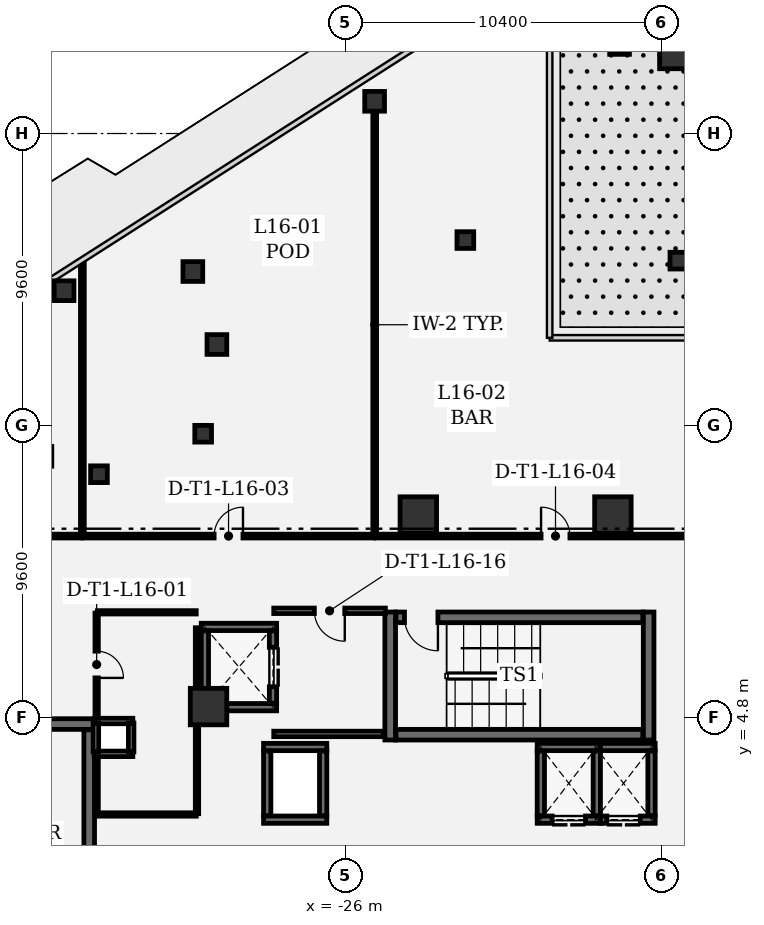
"""IFC4 building model, lengths in metres.
Left out: names, types, materials, properties, quantities, classifications, styles, units other than length and angle.
Written with IfcOpenShell. Run it as: python <this file> out.ifc"""

import sys

from ifc_helpers import new_model, si_unit, direction, frame, frame_2d, origin, origin_2d, place, context, subcontext, project, spatial, rectangle, extrude, element, fill, save


model = new_model("IFC4")
c1 = context("Model", 3, precision=1e-05, world=origin(), true_north=direction((0.0, 1.0)))
c2 = subcontext(c1, "Body", "Model", "MODEL_VIEW")
j1 = project(units=[si_unit("LENGTHUNIT", "METRE"), si_unit("PLANEANGLEUNIT", "RADIAN")], contexts=[c1])
p1 = place(None, origin())
s1 = spatial("IfcSite", under=j1, at=p1, CompositionType="ELEMENT")
p2 = place(p1, origin())
s2 = spatial("IfcBuilding", under=s1, at=p2, CompositionType="ELEMENT")
p3 = place(p2, frame((0.0, 0.0, 74.4)))
s3 = spatial("IfcBuildingStorey", under=s2, at=p3, CompositionType="ELEMENT", Elevation=74.4)
p4 = place(p3, frame((-14.464, 27.331, 0.0), z_axis=(0.0, 0.0, 1.0), x_axis=(1.0, 0.0, 0.0)))
e1 = element("IfcColumn", 1, at=p4, inside=s3, PredefinedType="COLUMN", context=c2, shape_type="SweptSolid", body=[
    extrude(rectangle(XDim=2.4, YDim=2.4, at=origin_2d()), origin(), (0.0, 0.0, 1.0), 4.2),
])
for number, where, z_axis, x_axis in (
    (2, (-23.6, 11.45, 0.0), (0.0, 0.0, 1.0), (1.0, 0.0, 0.0)),
    (3, (-17.2, 11.45, 0.0), (0.0, 0.0, 1.0), (1.0, 0.0, 0.0)),
    (4, (-30.5, 5.15, 0.0), (0.0, 0.0, 1.0), (1.0, 0.0, 0.0)),
):
    element("IfcColumn", number, at=place(p3, frame(where, z_axis=z_axis, x_axis=x_axis)), inside=s3, PredefinedType="COLUMN", context=c2, shape_type="SweptSolid", body=[
        extrude(rectangle(XDim=1.2, YDim=1.2, at=origin_2d()), origin(), (0.0, 0.0, 1.0), 4.2),
    ])
for number, where, z_axis, x_axis in (
    (5, (-35.252, 18.829, 0.0), (0.0, 0.0, 1.0), (1.0, 0.0, 0.0)),
    (6, (-25.038, 25.059, 0.0), (0.0, 0.0, 1.0), (1.0, 0.0, 0.0)),
    (7, (-31.016, 19.46, 0.0), (0.0, 0.0, 1.0), (1.0, 0.0, 0.0)),
    (8, (-16.981, 26.929, 0.0), (0.0, 0.0, 1.0), (1.0, 0.0, 0.0)),
    (9, (-30.225, 17.06, 0.0), (0.0, 0.0, 1.0), (1.0, 0.0, 0.0)),
):
    element("IfcColumn", number, at=place(p3, frame(where, z_axis=z_axis, x_axis=x_axis)), inside=s3, PredefinedType="COLUMN", context=c2, shape_type="SweptSolid", body=[
        extrude(rectangle(XDim=0.65, YDim=0.65, at=origin_2d()), origin(), (0.0, 0.0, 1.0), 4.2),
    ])
for number, where, z_axis, x_axis in (
    (10, (-34.104, 12.792, 0.0), (0.0, 0.0, 1.0), (1.0, 0.0, 0.0)),
    (11, (-22.053, 20.495, 0.0), (0.0, 0.0, 1.0), (1.0, 0.0, 0.0)),
    (12, (-30.677, 14.124, 0.0), (0.0, 0.0, 1.0), (1.0, 0.0, 0.0)),
    (13, (-15.046, 19.818, 0.0), (0.0, 0.0, 1.0), (1.0, 0.0, 0.0)),
):
    element("IfcColumn", number, at=place(p3, frame(where, z_axis=z_axis, x_axis=x_axis)), inside=s3, PredefinedType="COLUMN", context=c2, shape_type="SweptSolid", body=[
        extrude(rectangle(XDim=0.55, YDim=0.55, at=origin_2d()), origin(), (0.0, 0.0, 1.0), 4.2),
    ])
for number, where, z_axis, x_axis in (
    (14, (-24.525, 8.26, 0.0), (0.0, 0.0, 1.0), (0.0, -1.0, 0.0)),
    (15, (-16.025, 4.05, 0.0), (0.0, 0.0, 1.0), (0.0, 1.0, 0.0)),
):
    element("IfcWall", number, at=place(p3, frame(where, z_axis=z_axis, x_axis=x_axis)), inside=s3, PredefinedType="SHEAR", context=c2, shape_type="SweptSolid", body=[
        extrude(rectangle(XDim=4.21, YDim=0.35, at=frame_2d((2.105, 0.0))), origin(), (0.0, 0.0, 1.0), 3.92),
    ])
p5 = place(p3, frame((-24.335, 4.225, 0.0), z_axis=(0.0, 0.0, 1.0), x_axis=(1.0, 0.0, 0.0)))
e16 = element("IfcWall", 16, at=p5, inside=s3, PredefinedType="SHEAR", context=c2, shape_type="SweptSolid", body=[
    extrude(rectangle(XDim=8.12, YDim=0.35, at=frame_2d((4.06, 0.0))), origin(), (0.0, 0.0, 1.0), 3.92),
])
p6 = place(p3, frame((-16.215, 8.085, 0.0), z_axis=(0.0, 0.0, 1.0), x_axis=(-1.0, 0.0, 0.0)))
e17 = element("IfcWall", 17, at=p6, inside=s3, PredefinedType="SHEAR", context=c2, shape_type="SweptSolid", body=[
    extrude(rectangle(XDim=8.12, YDim=0.35, at=frame_2d((4.06, 0.0))), origin(), (0.0, 0.0, 1.0), 3.92),
])
p7 = place(p6, frame((6.74, 0.0, 0.0)))
e18 = element("IfcOpeningElement", 18, at=p7, cuts=e17, PredefinedType="OPENING", context=c2, shape_type="SweptSolid", body=[
    extrude(rectangle(XDim=1.1, YDim=2.2, at=frame_2d((0.55, 1.1))), frame((0.0, 0.185, 0.0), z_axis=(0.0, -1.0, 0.0), x_axis=(1.0, 0.0, 0.0)), (0.0, 0.0, 1.0), 0.37),
])
p8 = place(p3, frame((-34.25, 4.575, 0.0), z_axis=(0.0, 0.0, 1.0), x_axis=(-1.0, 0.0, 0.0)))
e19 = element("IfcWall", 19, at=p8, inside=s3, PredefinedType="SHEAR", context=c2, shape_type="SweptSolid", body=[
    extrude(rectangle(XDim=4.21, YDim=0.35, at=frame_2d((2.105, 0.0))), origin(), (0.0, 0.0, 1.0), 3.92),
])
p9 = place(p3, frame((-34.425, -4.385, 0.0), z_axis=(0.0, 0.0, 1.0), x_axis=(0.0, 1.0, 0.0)))
e20 = element("IfcWall", 20, at=p9, inside=s3, PredefinedType="SHEAR", context=c2, shape_type="SweptSolid", body=[
    extrude(rectangle(XDim=8.77, YDim=0.35, at=frame_2d((4.385, 0.0))), origin(), (0.0, 0.0, 1.0), 3.92),
])
for number, where, z_axis, x_axis in (
    (21, (-28.26, 5.13, 0.0), (0.0, 0.0, 1.0), (-1.0, 0.0, 0.0)),
    (22, (-30.74, 7.77, 0.0), (0.0, 0.0, 1.0), (1.0, 0.0, 0.0)),
):
    element("IfcWall", number, at=place(p3, frame(where, z_axis=z_axis, x_axis=x_axis)), inside=s3, PredefinedType="SHEAR", context=c2, shape_type="SweptSolid", body=[
        extrude(rectangle(XDim=2.48, YDim=0.24, at=frame_2d((1.24, 0.0))), origin(), (0.0, 0.0, 1.0), 3.92),
    ])
p10 = place(p3, frame((-30.62, 5.262, 0.0), z_axis=(0.0, 0.0, 1.0), x_axis=(0.0, 1.0, 0.0)))
e23 = element("IfcWall", 23, at=p10, inside=s3, PredefinedType="SHEAR", context=c2, shape_type="SweptSolid", body=[
    extrude(rectangle(XDim=2.376, YDim=0.24, at=frame_2d((1.188, 0.0))), origin(), (0.0, 0.0, 1.0), 3.92),
])
p11 = place(p3, frame((-28.38, 7.638, 0.0), z_axis=(0.0, 0.0, 1.0), x_axis=(0.0, -1.0, 0.0)))
e24 = element("IfcWall", 24, at=p11, inside=s3, PredefinedType="SHEAR", context=c2, shape_type="SweptSolid", body=[
    extrude(rectangle(XDim=2.376, YDim=0.24, at=frame_2d((1.188, 0.0))), origin(), (0.0, 0.0, 1.0), 3.92),
])
p12 = place(p11, frame((0.538, 0.0, 0.0)))
e25 = element("IfcOpeningElement", 25, at=p12, cuts=e24, PredefinedType="OPENING", context=c2, shape_type="SweptSolid", body=[
    extrude(rectangle(XDim=1.3, YDim=2.3, at=frame_2d((0.65, 1.15))), frame((0.0, 0.13, 0.0), z_axis=(0.0, -1.0, 0.0), x_axis=(1.0, 0.0, 0.0)), (0.0, 0.0, 1.0), 0.26),
])
for number, where, z_axis, x_axis in (
    (26, (-26.61, 1.43, 0.0), (0.0, 0.0, 1.0), (-1.0, 0.0, 0.0)),
    (27, (-28.69, 3.82, 0.0), (0.0, 0.0, 1.0), (1.0, 0.0, 0.0)),
):
    element("IfcWall", number, at=place(p3, frame(where, z_axis=z_axis, x_axis=x_axis)), inside=s3, PredefinedType="SHEAR", context=c2, shape_type="SweptSolid", body=[
        extrude(rectangle(XDim=2.08, YDim=0.24, at=frame_2d((1.04, 0.0))), origin(), (0.0, 0.0, 1.0), 3.92),
    ])
for number, where, z_axis, x_axis in (
    (28, (-28.57, 1.562, 0.0), (0.0, 0.0, 1.0), (0.0, 1.0, 0.0)),
    (29, (-26.73, 3.688, 0.0), (0.0, 0.0, 1.0), (0.0, -1.0, 0.0)),
):
    element("IfcWall", number, at=place(p3, frame(where, z_axis=z_axis, x_axis=x_axis)), inside=s3, PredefinedType="SHEAR", context=c2, shape_type="SweptSolid", body=[
        extrude(rectangle(XDim=2.126, YDim=0.24, at=frame_2d((1.063, 0.0))), origin(), (0.0, 0.0, 1.0), 3.92),
    ])
p13 = place(p3, frame((-17.61, 1.43, 0.0), z_axis=(0.0, 0.0, 1.0), x_axis=(-1.0, 0.0, 0.0)))
e30 = element("IfcWall", 30, at=p13, inside=s3, PredefinedType="SHEAR", context=c2, shape_type="SweptSolid", body=[
    extrude(rectangle(XDim=2.08, YDim=0.24, at=frame_2d((1.04, 0.0))), origin(), (0.0, 0.0, 1.0), 3.92),
])
p14 = place(p13, frame((0.49, 0.0, 0.0)))
e31 = element("IfcOpeningElement", 31, at=p14, cuts=e30, PredefinedType="OPENING", context=c2, shape_type="SweptSolid", body=[
    extrude(rectangle(XDim=1.1, YDim=2.2, at=frame_2d((0.55, 1.1))), frame((0.0, 0.13, 0.0), z_axis=(0.0, -1.0, 0.0), x_axis=(1.0, 0.0, 0.0)), (0.0, 0.0, 1.0), 0.26),
])
p15 = place(p3, frame((-19.69, 3.82, 0.0), z_axis=(0.0, 0.0, 1.0), x_axis=(1.0, 0.0, 0.0)))
e32 = element("IfcWall", 32, at=p15, inside=s3, PredefinedType="SHEAR", context=c2, shape_type="SweptSolid", body=[
    extrude(rectangle(XDim=2.08, YDim=0.24, at=frame_2d((1.04, 0.0))), origin(), (0.0, 0.0, 1.0), 3.92),
])
for number, where, z_axis, x_axis in (
    (33, (-19.57, 1.562, 0.0), (0.0, 0.0, 1.0), (0.0, 1.0, 0.0)),
    (34, (-17.73, 3.688, 0.0), (0.0, 0.0, 1.0), (0.0, -1.0, 0.0)),
):
    element("IfcWall", number, at=place(p3, frame(where, z_axis=z_axis, x_axis=x_axis)), inside=s3, PredefinedType="SHEAR", context=c2, shape_type="SweptSolid", body=[
        extrude(rectangle(XDim=2.126, YDim=0.24, at=frame_2d((1.063, 0.0))), origin(), (0.0, 0.0, 1.0), 3.92),
    ])
p16 = place(p3, frame((-15.81, 1.43, 0.0), z_axis=(0.0, 0.0, 1.0), x_axis=(-1.0, 0.0, 0.0)))
e35 = element("IfcWall", 35, at=p16, inside=s3, PredefinedType="SHEAR", context=c2, shape_type="SweptSolid", body=[
    extrude(rectangle(XDim=1.8, YDim=0.24, at=frame_2d((0.9, 0.0))), origin(), (0.0, 0.0, 1.0), 3.92),
])
p17 = place(p16, frame((0.49, 0.0, 0.0)))
e36 = element("IfcOpeningElement", 36, at=p17, cuts=e35, PredefinedType="OPENING", context=c2, shape_type="SweptSolid", body=[
    extrude(rectangle(XDim=1.1, YDim=2.2, at=frame_2d((0.55, 1.1))), frame((0.0, 0.13, 0.0), z_axis=(0.0, -1.0, 0.0), x_axis=(1.0, 0.0, 0.0)), (0.0, 0.0, 1.0), 0.26),
])
p18 = place(p3, frame((-17.61, 3.82, 0.0), z_axis=(0.0, 0.0, 1.0), x_axis=(1.0, 0.0, 0.0)))
e37 = element("IfcWall", 37, at=p18, inside=s3, PredefinedType="SHEAR", context=c2, shape_type="SweptSolid", body=[
    extrude(rectangle(XDim=1.8, YDim=0.24, at=frame_2d((0.9, 0.0))), origin(), (0.0, 0.0, 1.0), 3.92),
])
p19 = place(p3, frame((-15.93, 3.688, 0.0), z_axis=(0.0, 0.0, 1.0), x_axis=(0.0, -1.0, 0.0)))
e38 = element("IfcWall", 38, at=p19, inside=s3, PredefinedType="SHEAR", context=c2, shape_type="SweptSolid", body=[
    extrude(rectangle(XDim=2.126, YDim=0.24, at=frame_2d((1.063, 0.0))), origin(), (0.0, 0.0, 1.0), 3.92),
])
for number, where, z_axis, x_axis in (
    (39, (-32.99, 3.595, 0.0), (0.0, 0.0, 1.0), (-1.0, 0.0, 0.0)),
    (40, (-34.26, 4.675, 0.0), (0.0, 0.0, 1.0), (1.0, 0.0, 0.0)),
):
    element("IfcWall", number, at=place(p3, frame(where, z_axis=z_axis, x_axis=x_axis)), inside=s3, PredefinedType="PARTITIONING", context=c2, shape_type="SweptSolid", body=[
        extrude(rectangle(XDim=1.27, YDim=0.18, at=frame_2d((0.635, 0.0))), origin(), (0.0, 0.0, 1.0), 3.92),
    ])
for number, where, z_axis, x_axis in (
    (41, (-34.205, 3.66, 0.0), (0.0, 0.0, 1.0), (0.0, 1.0, 0.0)),
    (42, (-33.045, 4.61, 0.0), (0.0, 0.0, 1.0), (0.0, -1.0, 0.0)),
):
    element("IfcWall", number, at=place(p3, frame(where, z_axis=z_axis, x_axis=x_axis)), inside=s3, PredefinedType="PARTITIONING", context=c2, shape_type="SweptSolid", body=[
        extrude(rectangle(XDim=0.95, YDim=0.18, at=frame_2d((0.475, 0.0))), origin(), (0.0, 0.0, 1.0), 3.92),
    ])
p20 = place(p3, frame((-28.355, 4.25, 0.0), z_axis=(0.0, 0.0, 1.0), x_axis=(1.0, 0.0, 0.0)))
e43 = element("IfcWall", 43, at=p20, inside=s3, PredefinedType="PARTITIONING", context=c2, shape_type="SweptSolid", body=[
    extrude(rectangle(XDim=3.622, YDim=0.18, at=frame_2d((1.811, 0.0))), origin(), (0.0, 0.0, 1.0), 3.92),
])
p21 = place(p3, frame((-24.684, 8.3, 0.0), z_axis=(0.0, 0.0, 1.0), x_axis=(-1.0, 0.0, 0.0)))
e44 = element("IfcWall", 44, at=p21, inside=s3, PredefinedType="PARTITIONING", context=c2, shape_type="SweptSolid", body=[
    extrude(rectangle(XDim=3.671, YDim=0.18, at=frame_2d((1.835, 0.0))), origin(), (0.0, 0.0, 1.0), 3.92),
])
p22 = place(p21, frame((1.335, 0.0, 0.0)))
e45 = element("IfcOpeningElement", 45, at=p22, cuts=e44, PredefinedType="OPENING", context=c2, shape_type="SweptSolid", body=[
    extrude(rectangle(XDim=1.0, YDim=2.15, at=frame_2d((0.5, 1.075))), frame((0.0, 0.1, 0.0), z_axis=(0.0, -1.0, 0.0), x_axis=(1.0, 0.0, 0.0)), (0.0, 0.0, 1.0), 0.2),
])
p23 = place(p3, frame((-34.155, 1.6, 0.0), z_axis=(0.0, 0.0, 1.0), x_axis=(1.0, 0.0, 0.0)))
e46 = element("IfcWall", 46, at=p23, inside=s3, PredefinedType="PARTITIONING", context=c2, shape_type="SweptSolid", body=[
    extrude(rectangle(XDim=3.25, YDim=0.11, at=frame_2d((1.625, 0.0))), origin(), (0.0, 0.0, 1.0), 3.92),
])
p24 = place(p3, frame((-30.88, 1.625, 0.0), z_axis=(0.0, 0.0, 1.0), x_axis=(0.0, 1.0, 0.0)))
e47 = element("IfcWall", 47, at=p24, inside=s3, PredefinedType="PARTITIONING", context=c2, shape_type="SweptSolid", body=[
    extrude(rectangle(XDim=2.86, YDim=0.11, at=frame_2d((1.43, 0.0))), origin(), (0.0, 0.0, 1.0), 3.92),
])
p25 = place(p3, frame((-30.88, 5.815, 0.0), z_axis=(0.0, 0.0, 1.0), x_axis=(0.0, 1.0, 0.0)))
e48 = element("IfcWall", 48, at=p25, inside=s3, PredefinedType="PARTITIONING", context=c2, shape_type="SweptSolid", body=[
    extrude(rectangle(XDim=1.928, YDim=0.11, at=frame_2d((0.964, 0.0))), origin(), (0.0, 0.0, 1.0), 3.92),
])
p26 = place(p3, frame((-30.905, 8.25, 0.0), z_axis=(0.0, 0.0, 1.0), x_axis=(-1.0, 0.0, 0.0)))
e49 = element("IfcWall", 49, at=p26, inside=s3, PredefinedType="PARTITIONING", context=c2, shape_type="SweptSolid", body=[
    extrude(rectangle(XDim=3.25, YDim=0.11, at=frame_2d((1.625, 0.0))), origin(), (0.0, 0.0, 1.0), 3.92),
])
p27 = place(p3, frame((-34.18, 8.225, 0.0), z_axis=(0.0, 0.0, 1.0), x_axis=(0.0, -1.0, 0.0)))
e50 = element("IfcWall", 50, at=p27, inside=s3, PredefinedType="PARTITIONING", context=c2, shape_type="SweptSolid", body=[
    extrude(rectangle(XDim=3.385, YDim=0.11, at=frame_2d((1.692, 0.0))), origin(), (0.0, 0.0, 1.0), 3.92),
])
p28 = place(p27, frame((1.252, 0.0, 0.0)))
e51 = element("IfcOpeningElement", 51, at=p28, cuts=e50, PredefinedType="OPENING", context=c2, shape_type="SweptSolid", body=[
    extrude(rectangle(XDim=0.88, YDim=2.1, at=frame_2d((0.44, 1.05))), frame((0.0, 0.065, 0.0), z_axis=(0.0, -1.0, 0.0), x_axis=(1.0, 0.0, 0.0)), (0.0, 0.0, 1.0), 0.13),
])
p29 = place(p3, frame((-34.18, 3.43, 0.0), z_axis=(0.0, 0.0, 1.0), x_axis=(0.0, -1.0, 0.0)))
e52 = element("IfcWall", 52, at=p29, inside=s3, PredefinedType="PARTITIONING", context=c2, shape_type="SweptSolid", body=[
    extrude(rectangle(XDim=1.805, YDim=0.11, at=frame_2d((0.902, 0.0))), origin(), (0.0, 0.0, 1.0), 3.92),
])
p30 = place(p3, frame((-34.625, 10.758, 0.0), z_axis=(0.0, 0.0, 1.0), x_axis=(1.0, 0.0, 0.0)))
e53 = element("IfcWall", 53, at=p30, inside=s3, PredefinedType="PARTITIONING", context=c2, shape_type="SweptSolid", body=[
    extrude(rectangle(XDim=9.566, YDim=0.125, at=frame_2d((4.783, 0.0))), origin(), (0.0, 0.0, 1.0), 3.433),
])
p31 = place(p30, frame((4.308, 0.0, 0.0)))
e54 = element("IfcOpeningElement", 54, at=p31, cuts=e53, PredefinedType="OPENING", context=c2, shape_type="SweptSolid", body=[
    extrude(rectangle(XDim=0.95, YDim=2.15, at=frame_2d((0.475, 1.075))), frame((0.0, 0.073, 0.0), z_axis=(0.0, -1.0, 0.0), x_axis=(1.0, 0.0, 0.0)), (0.0, 0.0, 1.0), 0.145),
])
p32 = place(p3, frame((-25.034, 10.783, 0.0), z_axis=(0.0, 0.0, 1.0), x_axis=(0.0, 1.0, 0.0)))
e55 = element("IfcWall", 55, at=p32, inside=s3, PredefinedType="PARTITIONING", context=c2, shape_type="SweptSolid", body=[
    extrude(rectangle(XDim=13.885, YDim=0.125, at=frame_2d((6.943, 0.0))), origin(), (0.0, 0.0, 1.0), 3.433),
])
p33 = place(p3, frame((-34.65, 19.766, 0.0), z_axis=(0.0, 0.0, 1.0), x_axis=(0.0, -1.0, 0.0)))
e56 = element("IfcWall", 56, at=p33, inside=s3, PredefinedType="PARTITIONING", context=c2, shape_type="SweptSolid", body=[
    extrude(rectangle(XDim=8.983, YDim=0.125, at=frame_2d((4.492, 0.0))), origin(), (0.0, 0.0, 1.0), 3.92),
])
p34 = place(p3, frame((-25.001, 10.758, 0.0), z_axis=(0.0, 0.0, 1.0), x_axis=(1.0, 0.0, 0.0)))
e57 = element("IfcWall", 57, at=p34, inside=s3, PredefinedType="PARTITIONING", context=c2, shape_type="SweptSolid", body=[
    extrude(rectangle(XDim=11.826, YDim=0.125, at=frame_2d((5.913, 0.0))), origin(), (0.0, 0.0, 1.0), 2.957),
])
p35 = place(p34, frame((5.438, 0.0, 0.0)))
e58 = element("IfcOpeningElement", 58, at=p35, cuts=e57, PredefinedType="OPENING", context=c2, shape_type="SweptSolid", body=[
    extrude(rectangle(XDim=0.95, YDim=2.15, at=frame_2d((0.475, 1.075))), frame((0.0, 0.073, 0.0), z_axis=(0.0, -1.0, 0.0), x_axis=(1.0, 0.0, 0.0)), (0.0, 0.0, 1.0), 0.145),
])
p36 = place(p3, frame((-34.683, 10.758, 0.0), z_axis=(0.0, 0.0, 1.0), x_axis=(-1.0, 0.0, 0.0)))
e59 = element("IfcWall", 59, at=p36, inside=s3, PredefinedType="PARTITIONING", context=c2, shape_type="SweptSolid", body=[
    extrude(rectangle(XDim=5.95, YDim=0.125, at=frame_2d((2.975, 0.0))), origin(), (0.0, 0.0, 1.0), 3.433),
])
p37 = place(p7, origin())
e60 = element("IfcDoor", 60, at=p37, inside=s3, OperationType="SINGLE_SWING_LEFT", PredefinedType="DOOR", context=c2, shape_type="SweptSolid", body=[
    extrude(rectangle(XDim=1.1, YDim=2.2, at=frame_2d((0.55, 1.1))), frame((0.0, 0.025, 0.0), z_axis=(0.0, -1.0, 0.0), x_axis=(1.0, 0.0, 0.0)), (0.0, 0.0, 1.0), 0.05),
])
fill(e18, e60)
p38 = place(p12, origin())
e61 = element("IfcDoor", 61, at=p38, inside=s3, OperationType="DOUBLE_DOOR_SLIDING", PredefinedType="DOOR", context=c2, shape_type="SweptSolid", body=[
    extrude(rectangle(XDim=1.3, YDim=2.3, at=frame_2d((0.65, 1.15))), frame((0.0, 0.025, 0.0), z_axis=(0.0, -1.0, 0.0), x_axis=(1.0, 0.0, 0.0)), (0.0, 0.0, 1.0), 0.05),
])
fill(e25, e61)
p39 = place(p14, origin())
e62 = element("IfcDoor", 62, at=p39, inside=s3, OperationType="DOUBLE_DOOR_SLIDING", PredefinedType="DOOR", context=c2, shape_type="SweptSolid", body=[
    extrude(rectangle(XDim=1.1, YDim=2.2, at=frame_2d((0.55, 1.1))), frame((0.0, 0.025, 0.0), z_axis=(0.0, -1.0, 0.0), x_axis=(1.0, 0.0, 0.0)), (0.0, 0.0, 1.0), 0.05),
])
fill(e31, e62)
p40 = place(p17, origin())
e63 = element("IfcDoor", 63, at=p40, inside=s3, OperationType="DOUBLE_DOOR_SLIDING", PredefinedType="DOOR", context=c2, shape_type="SweptSolid", body=[
    extrude(rectangle(XDim=1.1, YDim=2.2, at=frame_2d((0.55, 1.1))), frame((0.0, 0.025, 0.0), z_axis=(0.0, -1.0, 0.0), x_axis=(1.0, 0.0, 0.0)), (0.0, 0.0, 1.0), 0.05),
])
fill(e36, e63)
p41 = place(p28, origin())
e64 = element("IfcDoor", 64, at=p41, inside=s3, OperationType="SINGLE_SWING_RIGHT", PredefinedType="DOOR", context=c2, shape_type="SweptSolid", body=[
    extrude(rectangle(XDim=0.88, YDim=2.1, at=frame_2d((0.44, 1.05))), frame((0.0, 0.025, 0.0), z_axis=(0.0, -1.0, 0.0), x_axis=(1.0, 0.0, 0.0)), (0.0, 0.0, 1.0), 0.05),
])
fill(e51, e64)
p42 = place(p31, origin())
e65 = element("IfcDoor", 65, at=p42, inside=s3, OperationType="SINGLE_SWING_RIGHT", PredefinedType="DOOR", context=c2, shape_type="SweptSolid", body=[
    extrude(rectangle(XDim=0.95, YDim=2.15, at=frame_2d((0.475, 1.075))), frame((0.0, 0.025, 0.0), z_axis=(0.0, -1.0, 0.0), x_axis=(1.0, 0.0, 0.0)), (0.0, 0.0, 1.0), 0.05),
])
fill(e54, e65)
p43 = place(p35, origin())
e66 = element("IfcDoor", 66, at=p43, inside=s3, OperationType="SINGLE_SWING_LEFT", PredefinedType="DOOR", context=c2, shape_type="SweptSolid", body=[
    extrude(rectangle(XDim=0.95, YDim=2.15, at=frame_2d((0.475, 1.075))), frame((0.0, 0.025, 0.0), z_axis=(0.0, -1.0, 0.0), x_axis=(1.0, 0.0, 0.0)), (0.0, 0.0, 1.0), 0.05),
])
fill(e58, e66)
p44 = place(p22, origin())
e67 = element("IfcDoor", 67, at=p44, inside=s3, OperationType="SINGLE_SWING_LEFT", PredefinedType="DOOR", context=c2, shape_type="SweptSolid", body=[
    extrude(rectangle(XDim=1.0, YDim=2.15, at=frame_2d((0.5, 1.075))), frame((0.0, 0.025, 0.0), z_axis=(0.0, -1.0, 0.0), x_axis=(1.0, 0.0, 0.0)), (0.0, 0.0, 1.0), 0.05),
])
fill(e45, e67)
save(model, sys.argv[1])
